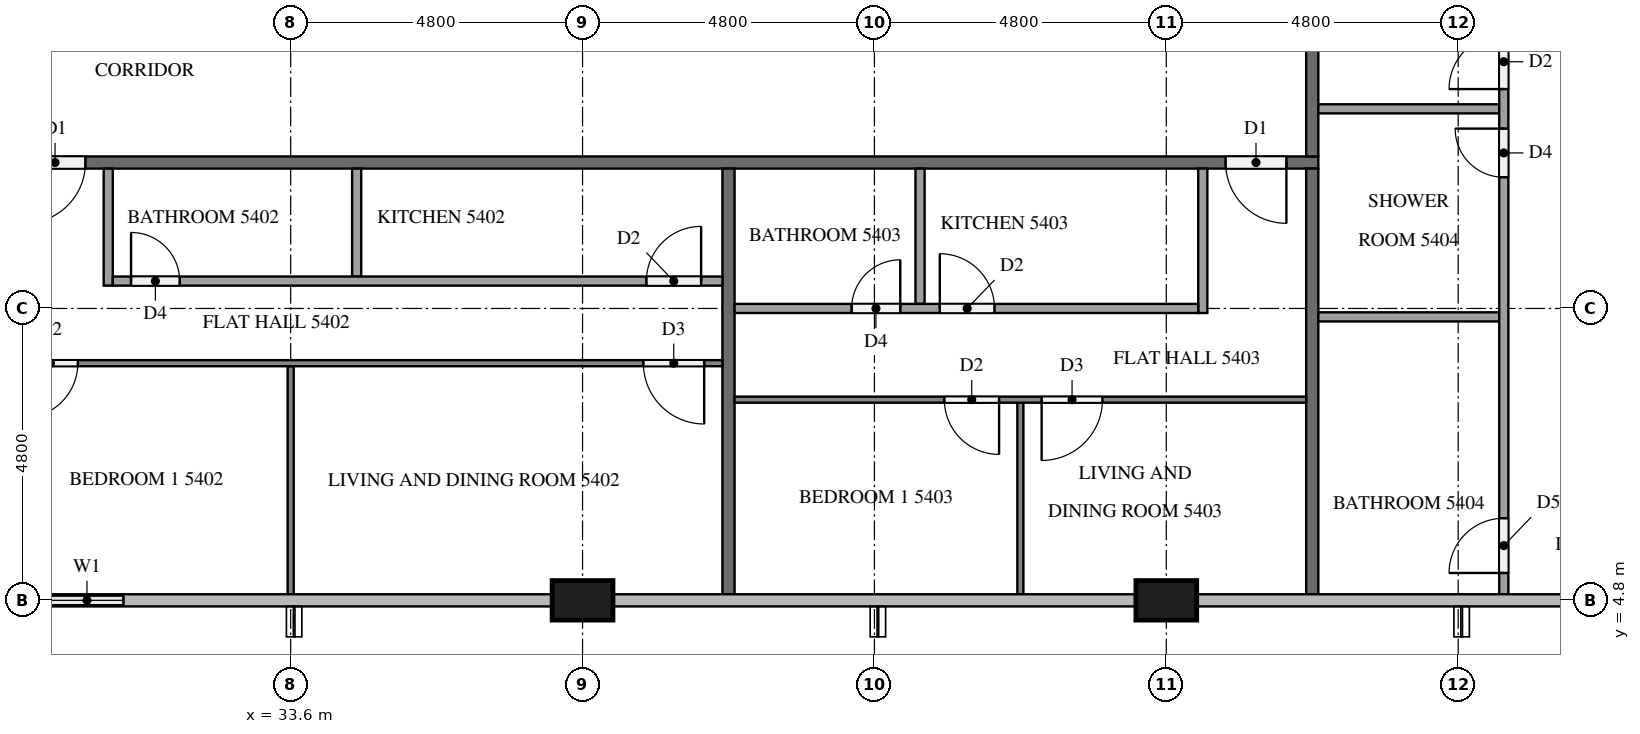
"""IFC4 building model, lengths in metres.
Left out: names, types, materials, properties, quantities, classifications, styles, units other than length and angle.
Written with IfcOpenShell. Run it as: python <this file> out.ifc"""

import sys

from ifc_helpers import new_model, si_unit, direction, frame, frame_2d, origin, origin_2d, place, context, subcontext, project, spatial, rectangle, extrude, element, fill, save


model = new_model("IFC4")
c1 = context("Model", 3, precision=1e-05, world=origin(), true_north=direction((0.0, 1.0)))
c2 = subcontext(c1, "Body", "Model", "MODEL_VIEW")
j1 = project(units=[si_unit("LENGTHUNIT", "METRE"), si_unit("PLANEANGLEUNIT", "RADIAN")], contexts=[c1])
p1 = place(None, origin())
s1 = spatial("IfcSite", under=j1, at=p1, CompositionType="ELEMENT")
p2 = place(p1, origin())
s2 = spatial("IfcBuilding", under=s1, at=p2, CompositionType="ELEMENT")
p3 = place(p2, frame((0.0, 0.0, 208.8)))
s3 = spatial("IfcBuildingStorey", under=s2, at=p3, CompositionType="ELEMENT", Elevation=208.8)
for number, where, z_axis, x_axis in (
    (1, (38.4, 4.8, 0.0), (0.0, 0.0, 1.0), (1.0, 0.0, 0.0)),
    (2, (48.0, 4.8, 0.0), (0.0, 0.0, 1.0), (1.0, 0.0, 0.0)),
):
    element("IfcColumn", number, at=place(p3, frame(where, z_axis=z_axis, x_axis=x_axis)), inside=s3, PredefinedType="COLUMN", context=c2, shape_type="SweptSolid", body=[
        extrude(rectangle(XDim=1.0, YDim=0.65, at=origin_2d()), origin(), (0.0, 0.0, 1.0), 3.2),
    ])
p4 = place(p3, frame((29.3, 4.8, 0.0), z_axis=(0.0, 0.0, 1.0), x_axis=(1.0, 0.0, 0.0)))
e3 = element("IfcWall", 3, at=p4, inside=s3, PredefinedType="SOLIDWALL", context=c2, shape_type="SweptSolid", body=[
    extrude(rectangle(XDim=1.9, YDim=0.15, at=frame_2d((0.95, 0.0))), origin(), (0.0, 0.0, 1.0), 3.2),
])
p5 = place(p4, frame((0.35, 0.0, 0.9)))
e4 = element("IfcOpeningElement", 4, at=p5, cuts=e3, PredefinedType="OPENING", context=c2, shape_type="SweptSolid", body=[
    extrude(rectangle(XDim=1.2, YDim=1.4, at=frame_2d((0.6, 0.7))), frame((0.0, 0.085, 0.0), z_axis=(0.0, -1.0, 0.0), x_axis=(1.0, 0.0, 0.0)), (0.0, 0.0, 1.0), 0.17),
])
p6 = place(p3, frame((50.5, 12.0, 0.0), z_axis=(0.0, 0.0, 1.0), x_axis=(-1.0, 0.0, 0.0)))
e5 = element("IfcWall", 5, at=p6, inside=s3, PredefinedType="PARTITIONING", context=c2, shape_type="SweptSolid", body=[
    extrude(rectangle(XDim=38.6, YDim=0.2, at=frame_2d((19.3, 0.0))), origin(), (0.0, 0.0, 1.0), 3.2),
])
p7 = place(p6, frame((37.075, 0.0, 0.0)))
e6 = element("IfcOpeningElement", 6, at=p7, cuts=e5, PredefinedType="OPENING", context=c2, shape_type="SweptSolid", body=[
    extrude(rectangle(XDim=1.0, YDim=2.1, at=frame_2d((0.5, 1.05))), frame((0.0, 0.11, 0.0), z_axis=(0.0, -1.0, 0.0), x_axis=(1.0, 0.0, 0.0)), (0.0, 0.0, 1.0), 0.22),
])
p8 = place(p6, frame((20.275, 0.0, 0.0)))
e7 = element("IfcOpeningElement", 7, at=p8, cuts=e5, PredefinedType="OPENING", context=c2, shape_type="SweptSolid", body=[
    extrude(rectangle(XDim=1.0, YDim=2.1, at=frame_2d((0.5, 1.05))), frame((0.0, 0.11, 0.0), z_axis=(0.0, -1.0, 0.0), x_axis=(1.0, 0.0, 0.0)), (0.0, 0.0, 1.0), 0.22),
])
p9 = place(p6, frame((0.525, 0.0, 0.0)))
e8 = element("IfcOpeningElement", 8, at=p9, cuts=e5, PredefinedType="OPENING", context=c2, shape_type="SweptSolid", body=[
    extrude(rectangle(XDim=1.0, YDim=2.1, at=frame_2d((0.5, 1.05))), frame((0.0, 0.11, 0.0), z_axis=(0.0, -1.0, 0.0), x_axis=(1.0, 0.0, 0.0)), (0.0, 0.0, 1.0), 0.22),
])
p10 = place(p3, frame((50.4, 40.7, 0.0), z_axis=(0.0, 0.0, 1.0), x_axis=(0.0, -1.0, 0.0)))
e9 = element("IfcWall", 9, at=p10, inside=s3, PredefinedType="PARTITIONING", context=c2, shape_type="SweptSolid", body=[
    extrude(rectangle(XDim=28.6, YDim=0.2, at=frame_2d((14.3, 0.0))), origin(), (0.0, 0.0, 1.0), 3.2),
])
p11 = place(p10, frame((19.525, 0.0, 0.0)))
e10 = element("IfcOpeningElement", 10, at=p11, cuts=e9, PredefinedType="OPENING", context=c2, shape_type="SweptSolid", body=[
    extrude(rectangle(XDim=1.0, YDim=2.1, at=frame_2d((0.5, 1.05))), frame((0.0, 0.11, 0.0), z_axis=(0.0, -1.0, 0.0), x_axis=(1.0, 0.0, 0.0)), (0.0, 0.0, 1.0), 0.22),
])
p12 = place(p10, frame((7.525, 0.0, 0.0)))
e11 = element("IfcOpeningElement", 11, at=p12, cuts=e9, PredefinedType="OPENING", context=c2, shape_type="SweptSolid", body=[
    extrude(rectangle(XDim=1.0, YDim=2.1, at=frame_2d((0.5, 1.05))), frame((0.0, 0.11, 0.0), z_axis=(0.0, -1.0, 0.0), x_axis=(1.0, 0.0, 0.0)), (0.0, 0.0, 1.0), 0.22),
])
p13 = place(p10, frame((0.325, 0.0, 0.0)))
e12 = element("IfcOpeningElement", 12, at=p13, cuts=e9, PredefinedType="OPENING", context=c2, shape_type="SweptSolid", body=[
    extrude(rectangle(XDim=1.0, YDim=2.1, at=frame_2d((0.5, 1.05))), frame((0.0, 0.11, 0.0), z_axis=(0.0, -1.0, 0.0), x_axis=(1.0, 0.0, 0.0)), (0.0, 0.0, 1.0), 0.22),
])
for number, where, z_axis, x_axis in (
    (13, (40.8, 11.9, 0.0), (0.0, 0.0, 1.0), (0.0, -1.0, 0.0)),
    (14, (50.4, 11.9, 0.0), (0.0, 0.0, 1.0), (0.0, -1.0, 0.0)),
):
    element("IfcWall", number, at=place(p3, frame(where, z_axis=z_axis, x_axis=x_axis)), inside=s3, PredefinedType="PARTITIONING", context=c2, shape_type="SweptSolid", body=[
        extrude(rectangle(XDim=7.0, YDim=0.2, at=frame_2d((3.5, 0.0))), origin(), (0.0, 0.0, 1.0), 3.2),
    ])
p14 = place(p3, frame((33.6, 8.65, 0.0), z_axis=(0.0, 0.0, 1.0), x_axis=(0.0, -1.0, 0.0)))
e15 = element("IfcWall", 15, at=p14, inside=s3, PredefinedType="PARTITIONING", context=c2, shape_type="SweptSolid", body=[
    extrude(rectangle(XDim=3.75, YDim=0.1, at=frame_2d((1.875, 0.0))), origin(), (0.0, 0.0, 1.0), 3.2),
])
p15 = place(p3, frame((40.7, 8.7, 0.0), z_axis=(0.0, 0.0, 1.0), x_axis=(-1.0, 0.0, 0.0)))
e16 = element("IfcWall", 16, at=p15, inside=s3, PredefinedType="PARTITIONING", context=c2, shape_type="SweptSolid", body=[
    extrude(rectangle(XDim=11.8, YDim=0.1, at=frame_2d((5.9, 0.0))), origin(), (0.0, 0.0, 1.0), 3.2),
])
p16 = place(p15, frame((10.6, 0.0, 0.0)))
e17 = element("IfcOpeningElement", 17, at=p16, cuts=e16, PredefinedType="OPENING", context=c2, shape_type="SweptSolid", body=[
    extrude(rectangle(XDim=0.9, YDim=2.1, at=frame_2d((0.45, 1.05))), frame((0.0, 0.06, 0.0), z_axis=(0.0, -1.0, 0.0), x_axis=(1.0, 0.0, 0.0)), (0.0, 0.0, 1.0), 0.12),
])
p17 = place(p15, frame((0.3, 0.0, 0.0)))
e18 = element("IfcOpeningElement", 18, at=p17, cuts=e16, PredefinedType="OPENING", context=c2, shape_type="SweptSolid", body=[
    extrude(rectangle(XDim=1.0, YDim=2.1, at=frame_2d((0.5, 1.05))), frame((0.0, 0.06, 0.0), z_axis=(0.0, -1.0, 0.0), x_axis=(1.0, 0.0, 0.0)), (0.0, 0.0, 1.0), 0.12),
])
p18 = place(p3, frame((34.685, 11.9, 0.0), z_axis=(0.0, 0.0, 1.0), x_axis=(0.0, -1.0, 0.0)))
e19 = element("IfcWall", 19, at=p18, inside=s3, PredefinedType="PARTITIONING", context=c2, shape_type="SweptSolid", body=[
    extrude(rectangle(XDim=1.775, YDim=0.15, at=frame_2d((0.887, 0.0))), origin(), (0.0, 0.0, 1.0), 3.2),
])
p19 = place(p3, frame((30.6, 11.9, 0.0), z_axis=(0.0, 0.0, 1.0), x_axis=(0.0, -1.0, 0.0)))
e20 = element("IfcWall", 20, at=p19, inside=s3, PredefinedType="PARTITIONING", context=c2, shape_type="SweptSolid", body=[
    extrude(rectangle(XDim=1.925, YDim=0.15, at=frame_2d((0.962, 0.0))), origin(), (0.0, 0.0, 1.0), 3.2),
])
p20 = place(p3, frame((30.675, 10.05, 0.0), z_axis=(0.0, 0.0, 1.0), x_axis=(1.0, 0.0, 0.0)))
e21 = element("IfcWall", 21, at=p20, inside=s3, PredefinedType="PARTITIONING", context=c2, shape_type="SweptSolid", body=[
    extrude(rectangle(XDim=10.025, YDim=0.15, at=frame_2d((5.012, 0.0))), origin(), (0.0, 0.0, 1.0), 3.2),
])
p21 = place(p20, frame((0.3, 0.0, 0.0)))
e22 = element("IfcOpeningElement", 22, at=p21, cuts=e21, PredefinedType="OPENING", context=c2, shape_type="SweptSolid", body=[
    extrude(rectangle(XDim=0.8, YDim=2.1, at=frame_2d((0.4, 1.05))), frame((0.0, 0.085, 0.0), z_axis=(0.0, -1.0, 0.0), x_axis=(1.0, 0.0, 0.0)), (0.0, 0.0, 1.0), 0.17),
])
p22 = place(p20, frame((8.775, 0.0, 0.0)))
e23 = element("IfcOpeningElement", 23, at=p22, cuts=e21, PredefinedType="OPENING", context=c2, shape_type="SweptSolid", body=[
    extrude(rectangle(XDim=0.9, YDim=2.1, at=frame_2d((0.45, 1.05))), frame((0.0, 0.085, 0.0), z_axis=(0.0, -1.0, 0.0), x_axis=(1.0, 0.0, 0.0)), (0.0, 0.0, 1.0), 0.17),
])
p23 = place(p3, frame((45.6, 8.05, 0.0), z_axis=(0.0, 0.0, 1.0), x_axis=(0.0, -1.0, 0.0)))
e24 = element("IfcWall", 24, at=p23, inside=s3, PredefinedType="PARTITIONING", context=c2, shape_type="SweptSolid", body=[
    extrude(rectangle(XDim=3.15, YDim=0.1, at=frame_2d((1.575, 0.0))), origin(), (0.0, 0.0, 1.0), 3.2),
])
p24 = place(p3, frame((50.3, 8.1, 0.0), z_axis=(0.0, 0.0, 1.0), x_axis=(-1.0, 0.0, 0.0)))
e25 = element("IfcWall", 25, at=p24, inside=s3, PredefinedType="PARTITIONING", context=c2, shape_type="SweptSolid", body=[
    extrude(rectangle(XDim=9.4, YDim=0.1, at=frame_2d((4.7, 0.0))), origin(), (0.0, 0.0, 1.0), 3.2),
])
p25 = place(p24, frame((3.35, 0.0, 0.0)))
e26 = element("IfcOpeningElement", 26, at=p25, cuts=e25, PredefinedType="OPENING", context=c2, shape_type="SweptSolid", body=[
    extrude(rectangle(XDim=1.0, YDim=2.1, at=frame_2d((0.5, 1.05))), frame((0.0, 0.06, 0.0), z_axis=(0.0, -1.0, 0.0), x_axis=(1.0, 0.0, 0.0)), (0.0, 0.0, 1.0), 0.12),
])
p26 = place(p24, frame((5.05, 0.0, 0.0)))
e27 = element("IfcOpeningElement", 27, at=p26, cuts=e25, PredefinedType="OPENING", context=c2, shape_type="SweptSolid", body=[
    extrude(rectangle(XDim=0.9, YDim=2.1, at=frame_2d((0.45, 1.05))), frame((0.0, 0.06, 0.0), z_axis=(0.0, -1.0, 0.0), x_axis=(1.0, 0.0, 0.0)), (0.0, 0.0, 1.0), 0.12),
])
p27 = place(p3, frame((43.95, 11.9, 0.0), z_axis=(0.0, 0.0, 1.0), x_axis=(0.0, -1.0, 0.0)))
e28 = element("IfcWall", 28, at=p27, inside=s3, PredefinedType="PARTITIONING", context=c2, shape_type="SweptSolid", body=[
    extrude(rectangle(XDim=2.225, YDim=0.15, at=frame_2d((1.112, 0.0))), origin(), (0.0, 0.0, 1.0), 3.2),
])
p28 = place(p3, frame((48.6, 11.9, 0.0), z_axis=(0.0, 0.0, 1.0), x_axis=(0.0, -1.0, 0.0)))
e29 = element("IfcWall", 29, at=p28, inside=s3, PredefinedType="PARTITIONING", context=c2, shape_type="SweptSolid", body=[
    extrude(rectangle(XDim=2.375, YDim=0.15, at=frame_2d((1.188, 0.0))), origin(), (0.0, 0.0, 1.0), 3.2),
])
p29 = place(p3, frame((40.9, 9.6, 0.0), z_axis=(0.0, 0.0, 1.0), x_axis=(1.0, 0.0, 0.0)))
e30 = element("IfcWall", 30, at=p29, inside=s3, PredefinedType="PARTITIONING", context=c2, shape_type="SweptSolid", body=[
    extrude(rectangle(XDim=7.625, YDim=0.15, at=frame_2d((3.812, 0.0))), origin(), (0.0, 0.0, 1.0), 3.2),
])
p30 = place(p29, frame((3.375, 0.0, 0.0)))
e31 = element("IfcOpeningElement", 31, at=p30, cuts=e30, PredefinedType="OPENING", context=c2, shape_type="SweptSolid", body=[
    extrude(rectangle(XDim=0.9, YDim=2.1, at=frame_2d((0.45, 1.05))), frame((0.0, 0.085, 0.0), z_axis=(0.0, -1.0, 0.0), x_axis=(1.0, 0.0, 0.0)), (0.0, 0.0, 1.0), 0.17),
])
p31 = place(p29, frame((1.925, 0.0, 0.0)))
e32 = element("IfcOpeningElement", 32, at=p31, cuts=e30, PredefinedType="OPENING", context=c2, shape_type="SweptSolid", body=[
    extrude(rectangle(XDim=0.8, YDim=2.1, at=frame_2d((0.4, 1.05))), frame((0.0, 0.085, 0.0), z_axis=(0.0, -1.0, 0.0), x_axis=(1.0, 0.0, 0.0)), (0.0, 0.0, 1.0), 0.17),
])
for number, where, z_axis, x_axis in (
    (33, (50.5, 12.883, 0.0), (0.0, 0.0, 1.0), (1.0, 0.0, 0.0)),
    (34, (50.5, 9.461, 0.0), (0.0, 0.0, 1.0), (1.0, 0.0, 0.0)),
):
    element("IfcWall", number, at=place(p3, frame(where, z_axis=z_axis, x_axis=x_axis)), inside=s3, PredefinedType="PARTITIONING", context=c2, shape_type="SweptSolid", body=[
        extrude(rectangle(XDim=2.975, YDim=0.15, at=frame_2d((1.488, 0.0))), origin(), (0.0, 0.0, 1.0), 3.2),
    ])
p32 = place(p3, frame((53.55, 4.9, 0.0), z_axis=(0.0, 0.0, 1.0), x_axis=(0.0, 1.0, 0.0)))
e35 = element("IfcWall", 35, at=p32, inside=s3, PredefinedType="PARTITIONING", context=c2, shape_type="SweptSolid", body=[
    extrude(rectangle(XDim=14.825, YDim=0.15, at=frame_2d((7.413, 0.0))), origin(), (0.0, 0.0, 1.0), 3.2),
])
p33 = place(p32, frame((8.308, 0.0, 0.0)))
e36 = element("IfcOpeningElement", 36, at=p33, cuts=e35, PredefinedType="OPENING", context=c2, shape_type="SweptSolid", body=[
    extrude(rectangle(XDim=0.9, YDim=2.1, at=frame_2d((0.45, 1.05))), frame((0.0, 0.085, 0.0), z_axis=(0.0, -1.0, 0.0), x_axis=(1.0, 0.0, 0.0)), (0.0, 0.0, 1.0), 0.17),
])
p34 = place(p32, frame((6.858, 0.0, 0.0)))
e37 = element("IfcOpeningElement", 37, at=p34, cuts=e35, PredefinedType="OPENING", context=c2, shape_type="SweptSolid", body=[
    extrude(rectangle(XDim=0.8, YDim=2.1, at=frame_2d((0.4, 1.05))), frame((0.0, 0.085, 0.0), z_axis=(0.0, -1.0, 0.0), x_axis=(1.0, 0.0, 0.0)), (0.0, 0.0, 1.0), 0.17),
])
p35 = place(p32, frame((0.35, 0.0, 0.0)))
e38 = element("IfcOpeningElement", 38, at=p35, cuts=e35, PredefinedType="OPENING", context=c2, shape_type="SweptSolid", body=[
    extrude(rectangle(XDim=0.9, YDim=2.1, at=frame_2d((0.45, 1.05))), frame((0.0, 0.085, 0.0), z_axis=(0.0, -1.0, 0.0), x_axis=(1.0, 0.0, 0.0)), (0.0, 0.0, 1.0), 0.17),
])
p36 = place(p5, origin())
e39 = element("IfcWindow", 39, at=p36, inside=s3, PartitioningType="SINGLE_PANEL", PredefinedType="WINDOW", context=c2, shape_type="SweptSolid", body=[
    extrude(rectangle(XDim=1.2, YDim=1.4, at=frame_2d((0.6, 0.7))), frame((0.0, 0.03, 0.0), z_axis=(0.0, -1.0, 0.0), x_axis=(1.0, 0.0, 0.0)), (0.0, 0.0, 1.0), 0.06),
])
fill(e4, e39)
p37 = place(p8, origin())
e40 = element("IfcDoor", 40, at=p37, inside=s3, OperationType="SINGLE_SWING_RIGHT", PredefinedType="DOOR", context=c2, shape_type="SweptSolid", body=[
    extrude(rectangle(XDim=1.0, YDim=2.1, at=frame_2d((0.5, 1.05))), frame((0.0, 0.025, 0.0), z_axis=(0.0, -1.0, 0.0), x_axis=(1.0, 0.0, 0.0)), (0.0, 0.0, 1.0), 0.05),
])
fill(e7, e40)
p38 = place(p9, origin())
e41 = element("IfcDoor", 41, at=p38, inside=s3, OperationType="SINGLE_SWING_LEFT", PredefinedType="DOOR", context=c2, shape_type="SweptSolid", body=[
    extrude(rectangle(XDim=1.0, YDim=2.1, at=frame_2d((0.5, 1.05))), frame((0.0, 0.025, 0.0), z_axis=(0.0, -1.0, 0.0), x_axis=(1.0, 0.0, 0.0)), (0.0, 0.0, 1.0), 0.05),
])
fill(e8, e41)
p39 = place(p16, origin())
e42 = element("IfcDoor", 42, at=p39, inside=s3, OperationType="SINGLE_SWING_RIGHT", PredefinedType="DOOR", context=c2, shape_type="SweptSolid", body=[
    extrude(rectangle(XDim=0.9, YDim=2.1, at=frame_2d((0.45, 1.05))), frame((0.0, 0.025, 0.0), z_axis=(0.0, -1.0, 0.0), x_axis=(1.0, 0.0, 0.0)), (0.0, 0.0, 1.0), 0.05),
])
fill(e17, e42)
p40 = place(p17, origin())
e43 = element("IfcDoor", 43, at=p40, inside=s3, OperationType="SINGLE_SWING_LEFT", PredefinedType="DOOR", context=c2, shape_type="SweptSolid", body=[
    extrude(rectangle(XDim=1.0, YDim=2.1, at=frame_2d((0.5, 1.05))), frame((0.0, 0.025, 0.0), z_axis=(0.0, -1.0, 0.0), x_axis=(1.0, 0.0, 0.0)), (0.0, 0.0, 1.0), 0.05),
])
fill(e18, e43)
p41 = place(p21, origin())
e44 = element("IfcDoor", 44, at=p41, inside=s3, OperationType="SINGLE_SWING_LEFT", PredefinedType="DOOR", context=c2, shape_type="SweptSolid", body=[
    extrude(rectangle(XDim=0.8, YDim=2.1, at=frame_2d((0.4, 1.05))), frame((0.0, 0.025, 0.0), z_axis=(0.0, -1.0, 0.0), x_axis=(1.0, 0.0, 0.0)), (0.0, 0.0, 1.0), 0.05),
])
fill(e22, e44)
p42 = place(p22, origin())
e45 = element("IfcDoor", 45, at=p42, inside=s3, OperationType="SINGLE_SWING_RIGHT", PredefinedType="DOOR", context=c2, shape_type="SweptSolid", body=[
    extrude(rectangle(XDim=0.9, YDim=2.1, at=frame_2d((0.45, 1.05))), frame((0.0, 0.025, 0.0), z_axis=(0.0, -1.0, 0.0), x_axis=(1.0, 0.0, 0.0)), (0.0, 0.0, 1.0), 0.05),
])
fill(e23, e45)
p43 = place(p25, origin())
e46 = element("IfcDoor", 46, at=p43, inside=s3, OperationType="SINGLE_SWING_RIGHT", PredefinedType="DOOR", context=c2, shape_type="SweptSolid", body=[
    extrude(rectangle(XDim=1.0, YDim=2.1, at=frame_2d((0.5, 1.05))), frame((0.0, 0.025, 0.0), z_axis=(0.0, -1.0, 0.0), x_axis=(1.0, 0.0, 0.0)), (0.0, 0.0, 1.0), 0.05),
])
fill(e26, e46)
p44 = place(p26, origin())
e47 = element("IfcDoor", 47, at=p44, inside=s3, OperationType="SINGLE_SWING_LEFT", PredefinedType="DOOR", context=c2, shape_type="SweptSolid", body=[
    extrude(rectangle(XDim=0.9, YDim=2.1, at=frame_2d((0.45, 1.05))), frame((0.0, 0.025, 0.0), z_axis=(0.0, -1.0, 0.0), x_axis=(1.0, 0.0, 0.0)), (0.0, 0.0, 1.0), 0.05),
])
fill(e27, e47)
p45 = place(p30, origin())
e48 = element("IfcDoor", 48, at=p45, inside=s3, OperationType="SINGLE_SWING_LEFT", PredefinedType="DOOR", context=c2, shape_type="SweptSolid", body=[
    extrude(rectangle(XDim=0.9, YDim=2.1, at=frame_2d((0.45, 1.05))), frame((0.0, 0.025, 0.0), z_axis=(0.0, -1.0, 0.0), x_axis=(1.0, 0.0, 0.0)), (0.0, 0.0, 1.0), 0.05),
])
fill(e31, e48)
p46 = place(p31, origin())
e49 = element("IfcDoor", 49, at=p46, inside=s3, OperationType="SINGLE_SWING_RIGHT", PredefinedType="DOOR", context=c2, shape_type="SweptSolid", body=[
    extrude(rectangle(XDim=0.8, YDim=2.1, at=frame_2d((0.4, 1.05))), frame((0.0, 0.025, 0.0), z_axis=(0.0, -1.0, 0.0), x_axis=(1.0, 0.0, 0.0)), (0.0, 0.0, 1.0), 0.05),
])
fill(e32, e49)
p47 = place(p33, origin())
e50 = element("IfcDoor", 50, at=p47, inside=s3, OperationType="SINGLE_SWING_LEFT", PredefinedType="DOOR", context=c2, shape_type="SweptSolid", body=[
    extrude(rectangle(XDim=0.9, YDim=2.1, at=frame_2d((0.45, 1.05))), frame((0.0, 0.025, 0.0), z_axis=(0.0, -1.0, 0.0), x_axis=(1.0, 0.0, 0.0)), (0.0, 0.0, 1.0), 0.05),
])
fill(e36, e50)
p48 = place(p34, origin())
e51 = element("IfcDoor", 51, at=p48, inside=s3, OperationType="SINGLE_SWING_RIGHT", PredefinedType="DOOR", context=c2, shape_type="SweptSolid", body=[
    extrude(rectangle(XDim=0.8, YDim=2.1, at=frame_2d((0.4, 1.05))), frame((0.0, 0.025, 0.0), z_axis=(0.0, -1.0, 0.0), x_axis=(1.0, 0.0, 0.0)), (0.0, 0.0, 1.0), 0.05),
])
fill(e37, e51)
p49 = place(p35, origin())
e52 = element("IfcDoor", 52, at=p49, inside=s3, OperationType="SINGLE_SWING_LEFT", PredefinedType="DOOR", context=c2, shape_type="SweptSolid", body=[
    extrude(rectangle(XDim=0.9, YDim=2.1, at=frame_2d((0.45, 1.05))), frame((0.0, 0.025, 0.0), z_axis=(0.0, -1.0, 0.0), x_axis=(1.0, 0.0, 0.0)), (0.0, 0.0, 1.0), 0.05),
])
fill(e38, e52)
save(model, sys.argv[1])
